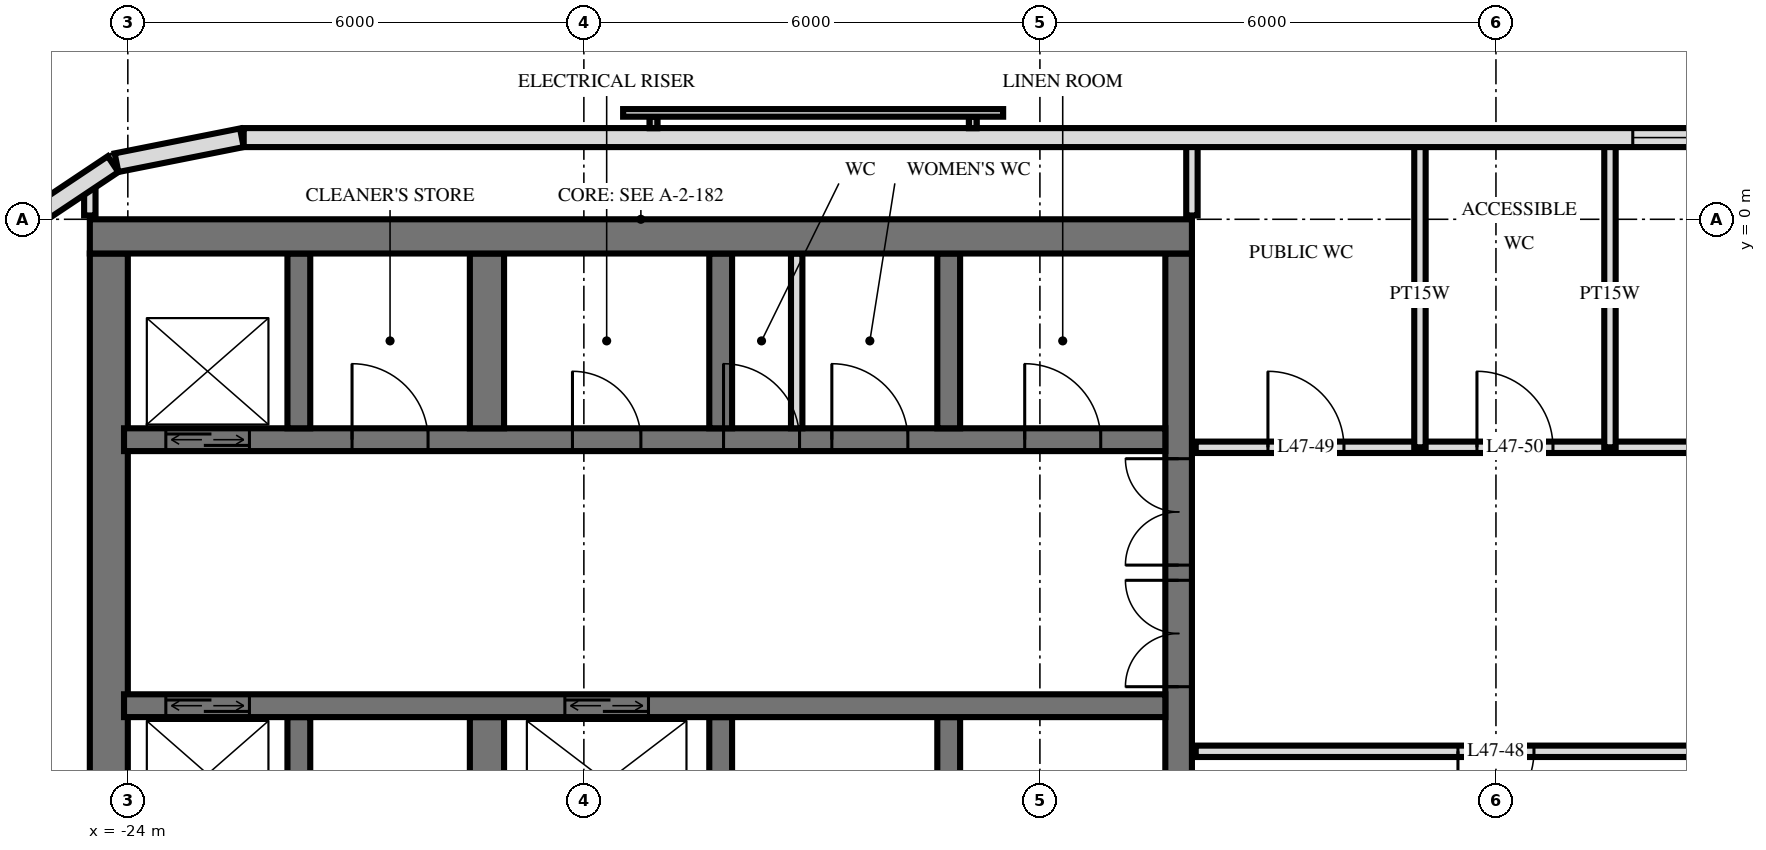
"""IFC4 building model, lengths in metres.
Left out: names, types, materials, properties, quantities, classifications, styles, units other than length and angle.
Written with IfcOpenShell. Run it as: python <this file> out.ifc"""

import sys

from ifc_helpers import new_model, si_unit, direction, frame, frame_2d, origin, place, context, subcontext, project, spatial, rectangle, extrude, element, fill, save


model = new_model("IFC4")
c1 = context("Model", 3, precision=1e-05, world=origin(), true_north=direction((0.0, 1.0)))
c2 = subcontext(c1, "Body", "Model", "MODEL_VIEW")
j1 = project(units=[si_unit("LENGTHUNIT", "METRE"), si_unit("PLANEANGLEUNIT", "RADIAN")], contexts=[c1])
p1 = place(None, origin())
s1 = spatial("IfcSite", under=j1, at=p1, CompositionType="ELEMENT")
p2 = place(p1, origin())
s2 = spatial("IfcBuilding", under=s1, at=p2, CompositionType="ELEMENT")
p3 = place(p2, frame((0.0, 0.0, 183.6)))
s3 = spatial("IfcBuildingStorey", under=s2, at=p3, CompositionType="ELEMENT", Elevation=183.6)
p4 = place(p3, frame((-24.5, -0.225, 0.0), z_axis=(0.0, 0.0, 1.0), x_axis=(1.0, 0.0, 0.0)))
e1 = element("IfcWall", 1, at=p4, inside=s3, PredefinedType="SHEAR", context=c2, shape_type="SweptSolid", body=[
    extrude(rectangle(XDim=14.5, YDim=0.45, at=frame_2d((7.25, 0.0))), origin(), (0.0, 0.0, 1.0), 3.5),
])
p5 = place(p3, frame((-10.175, -14.55, 0.0), z_axis=(0.0, 0.0, 1.0), x_axis=(0.0, 1.0, 0.0)))
e2 = element("IfcWall", 2, at=p5, inside=s3, PredefinedType="SHEAR", context=c2, shape_type="SweptSolid", body=[
    extrude(rectangle(XDim=14.1, YDim=0.35, at=frame_2d((7.05, 0.0))), origin(), (0.0, 0.0, 1.0), 3.5),
])
p6 = place(p5, frame((8.4, 0.0, 0.0)))
e3 = element("IfcOpeningElement", 3, at=p6, cuts=e2, PredefinedType="OPENING", context=c2, shape_type="SweptSolid", body=[
    extrude(rectangle(XDim=1.4, YDim=2.4, at=frame_2d((0.7, 1.2))), frame((0.0, 0.185, 0.0), z_axis=(0.0, -1.0, 0.0), x_axis=(1.0, 0.0, 0.0)), (0.0, 0.0, 1.0), 0.37),
])
p7 = place(p5, frame((10.0, 0.0, 0.0)))
e4 = element("IfcOpeningElement", 4, at=p7, cuts=e2, PredefinedType="OPENING", context=c2, shape_type="SweptSolid", body=[
    extrude(rectangle(XDim=1.4, YDim=2.4, at=frame_2d((0.7, 1.2))), frame((0.0, 0.185, 0.0), z_axis=(0.0, -1.0, 0.0), x_axis=(1.0, 0.0, 0.0)), (0.0, 0.0, 1.0), 0.37),
])
p8 = place(p5, frame((4.0, 0.0, 0.0)))
e5 = element("IfcOpeningElement", 5, at=p8, cuts=e2, PredefinedType="OPENING", context=c2, shape_type="SweptSolid", body=[
    extrude(rectangle(XDim=1.2, YDim=2.1, at=frame_2d((0.6, 1.05))), frame((0.0, 0.185, 0.0), z_axis=(0.0, -1.0, 0.0), x_axis=(1.0, 0.0, 0.0)), (0.0, 0.0, 1.0), 0.37),
])
p9 = place(p3, frame((-24.25, -14.55, 0.0), z_axis=(0.0, 0.0, 1.0), x_axis=(0.0, 1.0, 0.0)))
e6 = element("IfcWall", 6, at=p9, inside=s3, PredefinedType="SHEAR", context=c2, shape_type="SweptSolid", body=[
    extrude(rectangle(XDim=14.1, YDim=0.5, at=frame_2d((7.05, 0.0))), origin(), (0.0, 0.0, 1.0), 3.5),
])
p10 = place(p3, frame((-24.05, -2.9, 0.0), z_axis=(0.0, 0.0, 1.0), x_axis=(1.0, 0.0, 0.0)))
e7 = element("IfcWall", 7, at=p10, inside=s3, PredefinedType="SHEAR", context=c2, shape_type="SweptSolid", body=[
    extrude(rectangle(XDim=13.7, YDim=0.3, at=frame_2d((6.85, 0.0))), origin(), (0.0, 0.0, 1.0), 3.5),
])
p11 = place(p10, frame((0.55, 0.0, 0.0)))
e8 = element("IfcOpeningElement", 8, at=p11, cuts=e7, PredefinedType="OPENING", context=c2, shape_type="SweptSolid", body=[
    extrude(rectangle(XDim=1.1, YDim=2.1, at=frame_2d((0.55, 1.05))), frame((0.0, 0.16, 0.0), z_axis=(0.0, -1.0, 0.0), x_axis=(1.0, 0.0, 0.0)), (0.0, 0.0, 1.0), 0.32),
])
p12 = place(p10, frame((5.9, 0.0, 0.0)))
e9 = element("IfcOpeningElement", 9, at=p12, cuts=e7, PredefinedType="OPENING", context=c2, shape_type="SweptSolid", body=[
    extrude(rectangle(XDim=0.9, YDim=2.1, at=frame_2d((0.45, 1.05))), frame((0.0, 0.16, 0.0), z_axis=(0.0, -1.0, 0.0), x_axis=(1.0, 0.0, 0.0)), (0.0, 0.0, 1.0), 0.32),
])
p13 = place(p10, frame((11.85, 0.0, 0.0)))
e10 = element("IfcOpeningElement", 10, at=p13, cuts=e7, PredefinedType="OPENING", context=c2, shape_type="SweptSolid", body=[
    extrude(rectangle(XDim=1.0, YDim=2.1, at=frame_2d((0.5, 1.05))), frame((0.0, 0.16, 0.0), z_axis=(0.0, -1.0, 0.0), x_axis=(1.0, 0.0, 0.0)), (0.0, 0.0, 1.0), 0.32),
])
p14 = place(p10, frame((9.312, 0.0, 0.0)))
e11 = element("IfcOpeningElement", 11, at=p14, cuts=e7, PredefinedType="OPENING", context=c2, shape_type="SweptSolid", body=[
    extrude(rectangle(XDim=1.0, YDim=2.1, at=frame_2d((0.5, 1.05))), frame((0.0, 0.16, 0.0), z_axis=(0.0, -1.0, 0.0), x_axis=(1.0, 0.0, 0.0)), (0.0, 0.0, 1.0), 0.32),
])
p15 = place(p10, frame((7.887, 0.0, 0.0)))
e12 = element("IfcOpeningElement", 12, at=p15, cuts=e7, PredefinedType="OPENING", context=c2, shape_type="SweptSolid", body=[
    extrude(rectangle(XDim=1.0, YDim=2.1, at=frame_2d((0.5, 1.05))), frame((0.0, 0.16, 0.0), z_axis=(0.0, -1.0, 0.0), x_axis=(1.0, 0.0, 0.0)), (0.0, 0.0, 1.0), 0.32),
])
p16 = place(p10, frame((3.0, 0.0, 0.0)))
e13 = element("IfcOpeningElement", 13, at=p16, cuts=e7, PredefinedType="OPENING", context=c2, shape_type="SweptSolid", body=[
    extrude(rectangle(XDim=1.0, YDim=2.1, at=frame_2d((0.5, 1.05))), frame((0.0, 0.16, 0.0), z_axis=(0.0, -1.0, 0.0), x_axis=(1.0, 0.0, 0.0)), (0.0, 0.0, 1.0), 0.32),
])
p17 = place(p3, frame((-24.05, -6.4, 0.0), z_axis=(0.0, 0.0, 1.0), x_axis=(1.0, 0.0, 0.0)))
e14 = element("IfcWall", 14, at=p17, inside=s3, PredefinedType="SHEAR", context=c2, shape_type="SweptSolid", body=[
    extrude(rectangle(XDim=13.7, YDim=0.3, at=frame_2d((6.85, 0.0))), origin(), (0.0, 0.0, 1.0), 3.5),
])
p18 = place(p17, frame((0.55, 0.0, 0.0)))
e15 = element("IfcOpeningElement", 15, at=p18, cuts=e14, PredefinedType="OPENING", context=c2, shape_type="SweptSolid", body=[
    extrude(rectangle(XDim=1.1, YDim=2.1, at=frame_2d((0.55, 1.05))), frame((0.0, 0.16, 0.0), z_axis=(0.0, -1.0, 0.0), x_axis=(1.0, 0.0, 0.0)), (0.0, 0.0, 1.0), 0.32),
])
p19 = place(p17, frame((5.8, 0.0, 0.0)))
e16 = element("IfcOpeningElement", 16, at=p19, cuts=e14, PredefinedType="OPENING", context=c2, shape_type="SweptSolid", body=[
    extrude(rectangle(XDim=1.1, YDim=2.1, at=frame_2d((0.55, 1.05))), frame((0.0, 0.16, 0.0), z_axis=(0.0, -1.0, 0.0), x_axis=(1.0, 0.0, 0.0)), (0.0, 0.0, 1.0), 0.32),
])
for number, where, z_axis, x_axis in (
    (17, (-13.2, -2.75, 0.0), (0.0, 0.0, 1.0), (0.0, 1.0, 0.0)),
    (18, (-13.2, -8.85, 0.0), (0.0, 0.0, 1.0), (0.0, 1.0, 0.0)),
    (19, (-16.2, -2.75, 0.0), (0.0, 0.0, 1.0), (0.0, 1.0, 0.0)),
    (20, (-16.2, -8.85, 0.0), (0.0, 0.0, 1.0), (0.0, 1.0, 0.0)),
):
    element("IfcWall", number, at=place(p3, frame(where, z_axis=z_axis, x_axis=x_axis)), inside=s3, PredefinedType="SHEAR", context=c2, shape_type="SweptSolid", body=[
        extrude(rectangle(XDim=2.3, YDim=0.3, at=frame_2d((1.15, 0.0))), origin(), (0.0, 0.0, 1.0), 3.5),
    ])
for number, where, z_axis, x_axis in (
    (21, (-19.275, -2.75, 0.0), (0.0, 0.0, 1.0), (0.0, 1.0, 0.0)),
    (22, (-19.275, -8.85, 0.0), (0.0, 0.0, 1.0), (0.0, 1.0, 0.0)),
):
    element("IfcWall", number, at=place(p3, frame(where, z_axis=z_axis, x_axis=x_axis)), inside=s3, PredefinedType="SHEAR", context=c2, shape_type="SweptSolid", body=[
        extrude(rectangle(XDim=2.3, YDim=0.45, at=frame_2d((1.15, 0.0))), origin(), (0.0, 0.0, 1.0), 3.5),
    ])
for number, where, z_axis, x_axis in (
    (23, (-21.75, -2.75, 0.0), (0.0, 0.0, 1.0), (0.0, 1.0, 0.0)),
    (24, (-21.75, -8.85, 0.0), (0.0, 0.0, 1.0), (0.0, 1.0, 0.0)),
):
    element("IfcWall", number, at=place(p3, frame(where, z_axis=z_axis, x_axis=x_axis)), inside=s3, PredefinedType="SHEAR", context=c2, shape_type="SweptSolid", body=[
        extrude(rectangle(XDim=2.3, YDim=0.3, at=frame_2d((1.15, 0.0))), origin(), (0.0, 0.0, 1.0), 3.5),
    ])
p20 = place(p3, frame((22.475, 1.075, 0.0), z_axis=(0.0, 0.0, 1.0), x_axis=(-1.0, 0.0, 0.0)))
e25 = element("IfcWall", 25, at=p20, inside=s3, PredefinedType="SOLIDWALL", context=c2, shape_type="SweptSolid", body=[
    extrude(rectangle(XDim=44.951, YDim=0.25, at=frame_2d((22.475, 0.0))), origin(), (0.0, 0.0, 1.0), 3.22),
])
p21 = place(p20, frame((15.275, 0.0, 0.9)))
e26 = element("IfcOpeningElement", 26, at=p21, cuts=e25, PredefinedType="OPENING", context=c2, shape_type="SweptSolid", body=[
    extrude(rectangle(XDim=2.4, YDim=1.5, at=frame_2d((1.2, 0.75))), frame((0.0, 0.135, 0.0), z_axis=(0.0, -1.0, 0.0), x_axis=(1.0, 0.0, 0.0)), (0.0, 0.0, 1.0), 0.27),
])
p22 = place(p20, frame((21.275, 0.0, 0.9)))
e27 = element("IfcOpeningElement", 27, at=p22, cuts=e25, PredefinedType="OPENING", context=c2, shape_type="SweptSolid", body=[
    extrude(rectangle(XDim=2.4, YDim=1.5, at=frame_2d((1.2, 0.75))), frame((0.0, 0.135, 0.0), z_axis=(0.0, -1.0, 0.0), x_axis=(1.0, 0.0, 0.0)), (0.0, 0.0, 1.0), 0.27),
])
p23 = place(p20, frame((24.275, 0.0, 0.9)))
e28 = element("IfcOpeningElement", 28, at=p23, cuts=e25, PredefinedType="OPENING", context=c2, shape_type="SweptSolid", body=[
    extrude(rectangle(XDim=2.4, YDim=1.5, at=frame_2d((1.2, 0.75))), frame((0.0, 0.135, 0.0), z_axis=(0.0, -1.0, 0.0), x_axis=(1.0, 0.0, 0.0)), (0.0, 0.0, 1.0), 0.27),
])
p24 = place(p3, frame((-22.5, 1.073, 0.0), z_axis=(0.0, 0.0, 1.0), x_axis=(-0.980803419081, -0.194999110559, 0.0)))
e29 = element("IfcWall", 29, at=p24, inside=s3, PredefinedType="SOLIDWALL", context=c2, shape_type="SweptSolid", body=[
    extrude(rectangle(XDim=1.681, YDim=0.25, at=frame_2d((0.841, 0.0))), origin(), (0.0, 0.0, 1.0), 3.22),
])
p25 = place(p3, frame((-24.194, 0.726, 0.0), z_axis=(0.0, 0.0, 1.0), x_axis=(-0.831482937015, -0.55555029066, 0.0)))
e30 = element("IfcWall", 30, at=p25, inside=s3, PredefinedType="SOLIDWALL", context=c2, shape_type="SweptSolid", body=[
    extrude(rectangle(XDim=1.656, YDim=0.25, at=frame_2d((0.828, 0.0))), origin(), (0.0, 0.0, 1.0), 3.22),
])
p26 = place(p3, frame((-15.2, -2.75, 0.0), z_axis=(0.0, 0.0, 1.0), x_axis=(0.0, 1.0, 0.0)))
e31 = element("IfcWall", 31, at=p26, inside=s3, PredefinedType="PARTITIONING", context=c2, shape_type="SweptSolid", body=[
    extrude(rectangle(XDim=2.3, YDim=0.15, at=frame_2d((1.15, 0.0))), origin(), (0.0, 0.0, 1.0), 3.2),
])
for number, where, z_axis, x_axis in (
    (32, (-4.5, -3.0, 0.0), (0.0, 0.0, 1.0), (0.0, 1.0, 0.0)),
    (33, (-7.0, -3.0, 0.0), (0.0, 0.0, 1.0), (0.0, 1.0, 0.0)),
):
    element("IfcWall", number, at=place(p3, frame(where, z_axis=z_axis, x_axis=x_axis)), inside=s3, PredefinedType="PLUMBINGWALL", context=c2, shape_type="SweptSolid", body=[
        extrude(rectangle(XDim=4.02, YDim=0.15, at=frame_2d((2.01, 0.0))), origin(), (0.0, 0.0, 1.0), 3.22),
    ])
p27 = place(p3, frame((-10.0, 0.05, 0.0), z_axis=(0.0, 0.0, 1.0), x_axis=(0.0, 1.0, 0.0)))
e34 = element("IfcWall", 34, at=p27, inside=s3, PredefinedType="PLUMBINGWALL", context=c2, shape_type="SweptSolid", body=[
    extrude(rectangle(XDim=0.97, YDim=0.15, at=frame_2d((0.485, 0.0))), origin(), (0.0, 0.0, 1.0), 3.22),
])
p28 = place(p3, frame((-24.5, 0.05, 0.0), z_axis=(0.0, 0.0, 1.0), x_axis=(0.0, 1.0, 0.0)))
e35 = element("IfcWall", 35, at=p28, inside=s3, PredefinedType="PARTITIONING", context=c2, shape_type="SweptSolid", body=[
    extrude(rectangle(XDim=0.405, YDim=0.15, at=frame_2d((0.203, 0.0))), origin(), (0.0, 0.0, 1.0), 3.22),
])
p29 = place(p3, frame((-9.95, -7.0, 0.0), z_axis=(0.0, 0.0, 1.0), x_axis=(1.0, 0.0, 0.0)))
e36 = element("IfcWall", 36, at=p29, inside=s3, PredefinedType="PARTITIONING", context=c2, shape_type="SweptSolid", body=[
    extrude(rectangle(XDim=19.9, YDim=0.15, at=frame_2d((9.95, 0.0))), origin(), (0.0, 0.0, 1.0), 3.22),
])
p30 = place(p29, frame((9.45, 0.0, 0.0)))
e37 = element("IfcOpeningElement", 37, at=p30, cuts=e36, PredefinedType="OPENING", context=c2, shape_type="SweptSolid", body=[
    extrude(rectangle(XDim=1.0, YDim=2.1, at=frame_2d((0.5, 1.05))), frame((0.0, 0.085, 0.0), z_axis=(0.0, -1.0, 0.0), x_axis=(1.0, 0.0, 0.0)), (0.0, 0.0, 1.0), 0.17),
])
p31 = place(p29, frame((3.45, 0.0, 0.0)))
e38 = element("IfcOpeningElement", 38, at=p31, cuts=e36, PredefinedType="OPENING", context=c2, shape_type="SweptSolid", body=[
    extrude(rectangle(XDim=1.0, YDim=2.1, at=frame_2d((0.5, 1.05))), frame((0.0, 0.085, 0.0), z_axis=(0.0, -1.0, 0.0), x_axis=(1.0, 0.0, 0.0)), (0.0, 0.0, 1.0), 0.17),
])
p32 = place(p3, frame((-9.95, -3.0, 0.0), z_axis=(0.0, 0.0, 1.0), x_axis=(1.0, 0.0, 0.0)))
e39 = element("IfcWall", 39, at=p32, inside=s3, PredefinedType="PARTITIONING", context=c2, shape_type="SweptSolid", body=[
    extrude(rectangle(XDim=19.9, YDim=0.15, at=frame_2d((9.95, 0.0))), origin(), (0.0, 0.0, 1.0), 3.22),
])
p33 = place(p32, frame((0.95, 0.0, 0.0)))
e40 = element("IfcOpeningElement", 40, at=p33, cuts=e39, PredefinedType="OPENING", context=c2, shape_type="SweptSolid", body=[
    extrude(rectangle(XDim=1.0, YDim=2.1, at=frame_2d((0.5, 1.05))), frame((0.0, 0.085, 0.0), z_axis=(0.0, -1.0, 0.0), x_axis=(1.0, 0.0, 0.0)), (0.0, 0.0, 1.0), 0.17),
])
p34 = place(p32, frame((3.7, 0.0, 0.0)))
e41 = element("IfcOpeningElement", 41, at=p34, cuts=e39, PredefinedType="OPENING", context=c2, shape_type="SweptSolid", body=[
    extrude(rectangle(XDim=1.0, YDim=2.1, at=frame_2d((0.5, 1.05))), frame((0.0, 0.085, 0.0), z_axis=(0.0, -1.0, 0.0), x_axis=(1.0, 0.0, 0.0)), (0.0, 0.0, 1.0), 0.17),
])
p35 = place(p32, frame((8.45, 0.0, 0.0)))
e42 = element("IfcOpeningElement", 42, at=p35, cuts=e39, PredefinedType="OPENING", context=c2, shape_type="SweptSolid", body=[
    extrude(rectangle(XDim=1.0, YDim=2.1, at=frame_2d((0.5, 1.05))), frame((0.0, 0.085, 0.0), z_axis=(0.0, -1.0, 0.0), x_axis=(1.0, 0.0, 0.0)), (0.0, 0.0, 1.0), 0.17),
])
p36 = place(p32, frame((15.7, 0.0, 0.0)))
e43 = element("IfcOpeningElement", 43, at=p36, cuts=e39, PredefinedType="OPENING", context=c2, shape_type="SweptSolid", body=[
    extrude(rectangle(XDim=1.0, YDim=2.1, at=frame_2d((0.5, 1.05))), frame((0.0, 0.085, 0.0), z_axis=(0.0, -1.0, 0.0), x_axis=(1.0, 0.0, 0.0)), (0.0, 0.0, 1.0), 0.17),
])
p37 = place(p23, origin())
e44 = element("IfcWindow", 44, at=p37, inside=s3, PartitioningType="SINGLE_PANEL", PredefinedType="WINDOW", context=c2, shape_type="SweptSolid", body=[
    extrude(rectangle(XDim=2.4, YDim=1.5, at=frame_2d((1.2, 0.75))), frame((0.0, 0.03, 0.0), z_axis=(0.0, -1.0, 0.0), x_axis=(1.0, 0.0, 0.0)), (0.0, 0.0, 1.0), 0.06),
])
fill(e28, e44)
p38 = place(p11, origin())
e45 = element("IfcDoor", 45, at=p38, inside=s3, OperationType="DOUBLE_DOOR_SLIDING", PredefinedType="USERDEFINED", context=c2, shape_type="SweptSolid", body=[
    extrude(rectangle(XDim=1.1, YDim=2.1, at=frame_2d((0.55, 1.05))), frame((0.0, 0.025, 0.0), z_axis=(0.0, -1.0, 0.0), x_axis=(1.0, 0.0, 0.0)), (0.0, 0.0, 1.0), 0.05),
])
fill(e8, e45)
p39 = place(p18, origin())
e46 = element("IfcDoor", 46, at=p39, inside=s3, OperationType="DOUBLE_DOOR_SLIDING", PredefinedType="USERDEFINED", context=c2, shape_type="SweptSolid", body=[
    extrude(rectangle(XDim=1.1, YDim=2.1, at=frame_2d((0.55, 1.05))), frame((0.0, 0.025, 0.0), z_axis=(0.0, -1.0, 0.0), x_axis=(1.0, 0.0, 0.0)), (0.0, 0.0, 1.0), 0.05),
])
fill(e15, e46)
p40 = place(p19, origin())
e47 = element("IfcDoor", 47, at=p40, inside=s3, OperationType="DOUBLE_DOOR_SLIDING", PredefinedType="USERDEFINED", context=c2, shape_type="SweptSolid", body=[
    extrude(rectangle(XDim=1.1, YDim=2.1, at=frame_2d((0.55, 1.05))), frame((0.0, 0.025, 0.0), z_axis=(0.0, -1.0, 0.0), x_axis=(1.0, 0.0, 0.0)), (0.0, 0.0, 1.0), 0.05),
])
fill(e16, e47)
p41 = place(p6, origin())
e48 = element("IfcDoor", 48, at=p41, inside=s3, OperationType="DOUBLE_DOOR_SINGLE_SWING", PredefinedType="DOOR", context=c2, shape_type="SweptSolid", body=[
    extrude(rectangle(XDim=1.4, YDim=2.4, at=frame_2d((0.7, 1.2))), frame((0.0, 0.025, 0.0), z_axis=(0.0, -1.0, 0.0), x_axis=(1.0, 0.0, 0.0)), (0.0, 0.0, 1.0), 0.05),
])
fill(e3, e48)
p42 = place(p7, origin())
e49 = element("IfcDoor", 49, at=p42, inside=s3, OperationType="DOUBLE_DOOR_SINGLE_SWING", PredefinedType="DOOR", context=c2, shape_type="SweptSolid", body=[
    extrude(rectangle(XDim=1.4, YDim=2.4, at=frame_2d((0.7, 1.2))), frame((0.0, 0.025, 0.0), z_axis=(0.0, -1.0, 0.0), x_axis=(1.0, 0.0, 0.0)), (0.0, 0.0, 1.0), 0.05),
])
fill(e4, e49)
p43 = place(p12, origin())
e50 = element("IfcDoor", 50, at=p43, inside=s3, OperationType="SINGLE_SWING_RIGHT", PredefinedType="DOOR", context=c2, shape_type="SweptSolid", body=[
    extrude(rectangle(XDim=0.9, YDim=2.1, at=frame_2d((0.45, 1.05))), frame((0.0, 0.025, 0.0), z_axis=(0.0, -1.0, 0.0), x_axis=(1.0, 0.0, 0.0)), (0.0, 0.0, 1.0), 0.05),
])
fill(e9, e50)
p44 = place(p13, origin())
e51 = element("IfcDoor", 51, at=p44, inside=s3, OperationType="SINGLE_SWING_RIGHT", PredefinedType="DOOR", context=c2, shape_type="SweptSolid", body=[
    extrude(rectangle(XDim=1.0, YDim=2.1, at=frame_2d((0.5, 1.05))), frame((0.0, 0.025, 0.0), z_axis=(0.0, -1.0, 0.0), x_axis=(1.0, 0.0, 0.0)), (0.0, 0.0, 1.0), 0.05),
])
fill(e10, e51)
p45 = place(p14, origin())
e52 = element("IfcDoor", 52, at=p45, inside=s3, OperationType="SINGLE_SWING_RIGHT", PredefinedType="DOOR", context=c2, shape_type="SweptSolid", body=[
    extrude(rectangle(XDim=1.0, YDim=2.1, at=frame_2d((0.5, 1.05))), frame((0.0, 0.025, 0.0), z_axis=(0.0, -1.0, 0.0), x_axis=(1.0, 0.0, 0.0)), (0.0, 0.0, 1.0), 0.05),
])
fill(e11, e52)
p46 = place(p15, origin())
e53 = element("IfcDoor", 53, at=p46, inside=s3, OperationType="SINGLE_SWING_RIGHT", PredefinedType="DOOR", context=c2, shape_type="SweptSolid", body=[
    extrude(rectangle(XDim=1.0, YDim=2.1, at=frame_2d((0.5, 1.05))), frame((0.0, 0.025, 0.0), z_axis=(0.0, -1.0, 0.0), x_axis=(1.0, 0.0, 0.0)), (0.0, 0.0, 1.0), 0.05),
])
fill(e12, e53)
p47 = place(p16, origin())
e54 = element("IfcDoor", 54, at=p47, inside=s3, OperationType="SINGLE_SWING_RIGHT", PredefinedType="DOOR", context=c2, shape_type="SweptSolid", body=[
    extrude(rectangle(XDim=1.0, YDim=2.1, at=frame_2d((0.5, 1.05))), frame((0.0, 0.025, 0.0), z_axis=(0.0, -1.0, 0.0), x_axis=(1.0, 0.0, 0.0)), (0.0, 0.0, 1.0), 0.05),
])
fill(e13, e54)
p48 = place(p31, frame((0.5, 0.0, 0.0), z_axis=(0.0, 0.0, 1.0), x_axis=(-1.0, 0.0, 0.0)))
e55 = element("IfcDoor", 55, at=p48, inside=s3, OperationType="SINGLE_SWING_LEFT", PredefinedType="DOOR", context=c2, shape_type="SweptSolid", body=[
    extrude(rectangle(XDim=1.0, YDim=2.1, at=frame_2d((0.0, 1.05))), frame((0.0, -0.025, 0.0), z_axis=(0.0, 1.0, 0.0), x_axis=(-1.0, 0.0, 0.0)), (0.0, 0.0, 1.0), 0.05),
])
fill(e38, e55)
p49 = place(p33, origin())
e56 = element("IfcDoor", 56, at=p49, inside=s3, OperationType="SINGLE_SWING_RIGHT", PredefinedType="DOOR", context=c2, shape_type="SweptSolid", body=[
    extrude(rectangle(XDim=1.0, YDim=2.1, at=frame_2d((0.5, 1.05))), frame((0.0, 0.025, 0.0), z_axis=(0.0, -1.0, 0.0), x_axis=(1.0, 0.0, 0.0)), (0.0, 0.0, 1.0), 0.05),
])
fill(e40, e56)
p50 = place(p34, origin())
e57 = element("IfcDoor", 57, at=p50, inside=s3, OperationType="SINGLE_SWING_RIGHT", PredefinedType="DOOR", context=c2, shape_type="SweptSolid", body=[
    extrude(rectangle(XDim=1.0, YDim=2.1, at=frame_2d((0.5, 1.05))), frame((0.0, 0.025, 0.0), z_axis=(0.0, -1.0, 0.0), x_axis=(1.0, 0.0, 0.0)), (0.0, 0.0, 1.0), 0.05),
])
fill(e41, e57)
save(model, sys.argv[1])
